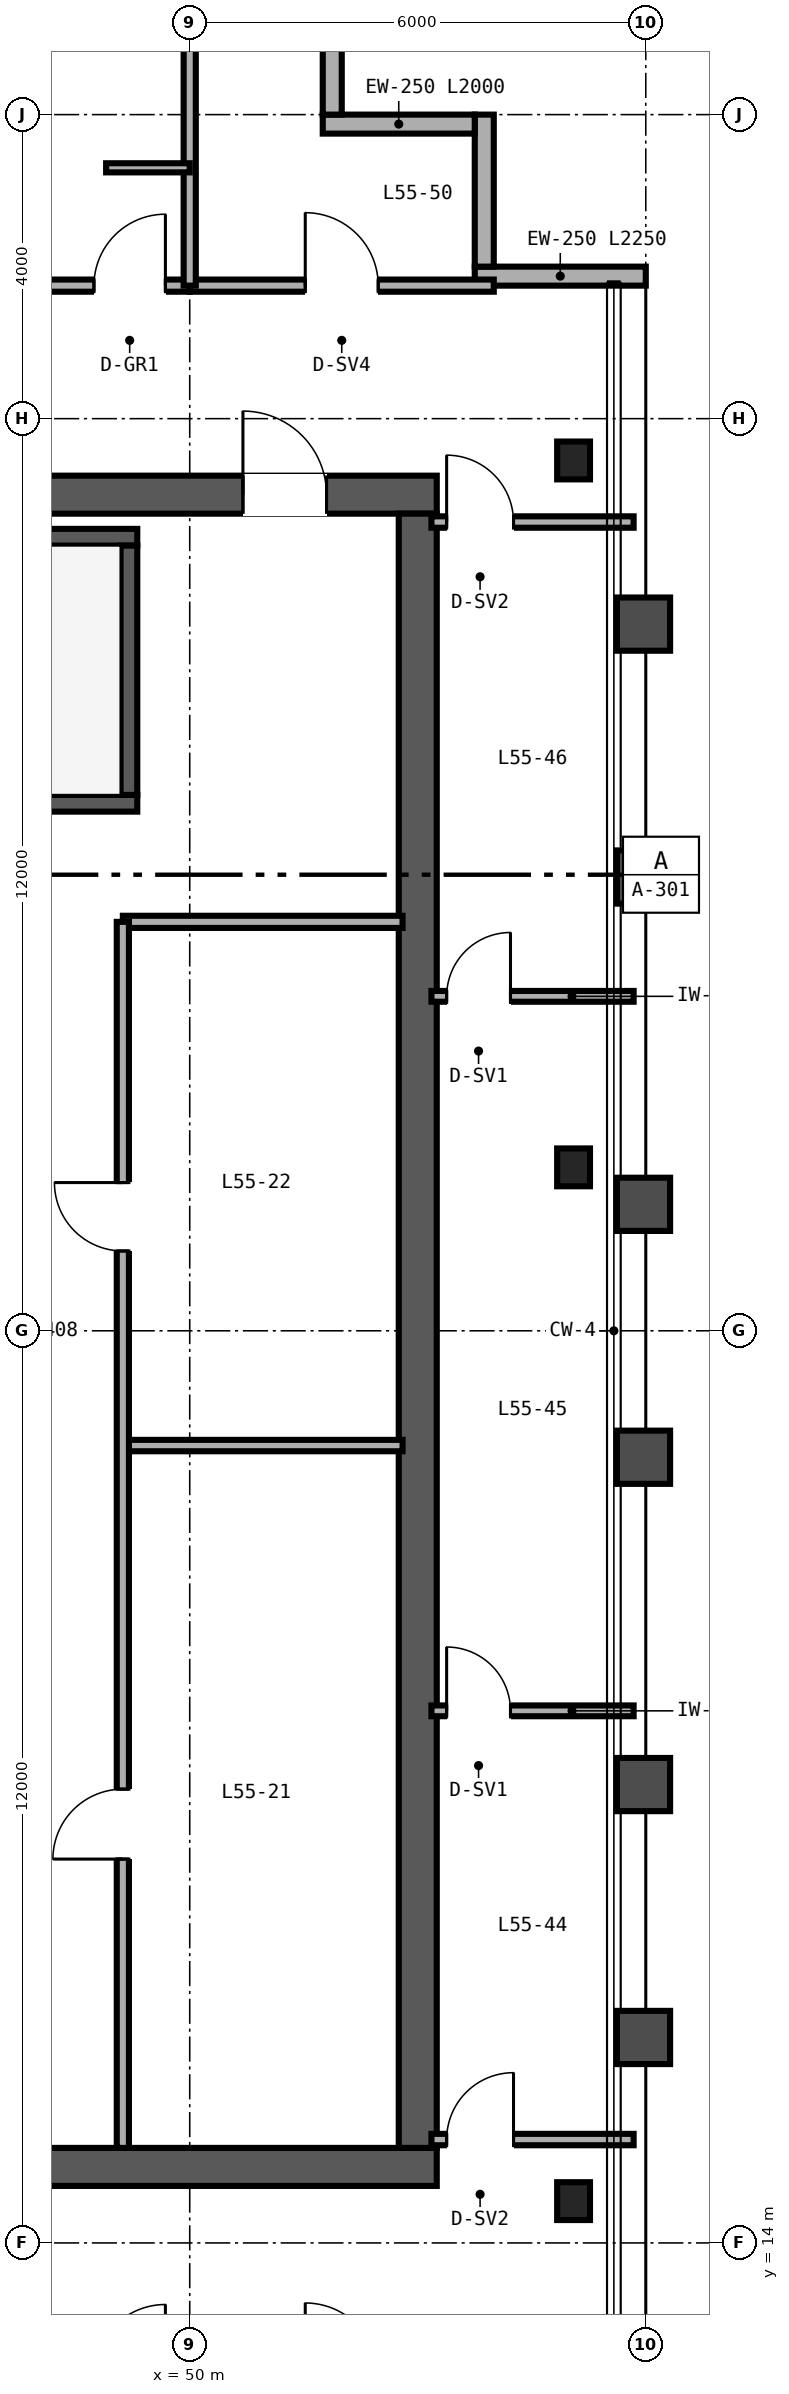
"""IFC4 building model, lengths in metres.
Left out: names, types, materials, properties, quantities, classifications, styles, units other than length and angle.
Written with IfcOpenShell. Run it as: python <this file> out.ifc"""

import sys

from ifc_helpers import new_model, si_unit, direction, frame, frame_2d, origin, origin_2d, place, context, subcontext, project, spatial, rectangle, i_section, extrude, source, transform, mapped, element, fill, save


model = new_model("IFC4")
c1 = context("Model", 3, precision=1e-05, world=origin(), true_north=direction((0.0, 1.0)))
c2 = subcontext(c1, "Body", "Model", "MODEL_VIEW")
j1 = project(units=[si_unit("LENGTHUNIT", "METRE"), si_unit("PLANEANGLEUNIT", "RADIAN")], contexts=[c1])
p1 = place(None, origin())
s1 = spatial("IfcSite", under=j1, at=p1, CompositionType="ELEMENT")
p2 = place(p1, origin())
s2 = spatial("IfcBuilding", under=s1, at=p2, CompositionType="ELEMENT")
p3 = place(p2, frame((0.0, 0.0, 217.2)))
s3 = spatial("IfcBuildingStorey", under=s2, at=p3, CompositionType="ELEMENT", Elevation=217.2)
p4 = place(p3, frame((40.75, 15.0, 0.0), z_axis=(0.0, 0.0, 1.0), x_axis=(1.0, 0.0, 0.0)))
e1 = element("IfcWall", 1, at=p4, inside=s3, PredefinedType="SHEAR", context=c2, shape_type="SweptSolid", body=[
    extrude(rectangle(XDim=12.5, YDim=0.5, at=frame_2d((6.25, 0.0))), origin(), (0.0, 0.0, 1.0), 3.28),
])
p5 = place(p4, frame((4.35, 0.0, 0.0)))
e2 = element("IfcOpeningElement", 2, at=p5, cuts=e1, PredefinedType="OPENING", context=c2, shape_type="SweptSolid", body=[
    extrude(rectangle(XDim=1.0, YDim=2.15, at=frame_2d((0.5, 1.075))), frame((0.0, 0.26, 0.0), z_axis=(0.0, -1.0, 0.0), x_axis=(1.0, 0.0, 0.0)), (0.0, 0.0, 1.0), 0.52),
])
p6 = place(p3, frame((40.75, 37.0, 0.0), z_axis=(0.0, 0.0, 1.0), x_axis=(1.0, 0.0, 0.0)))
e3 = element("IfcWall", 3, at=p6, inside=s3, PredefinedType="SHEAR", context=c2, shape_type="SweptSolid", body=[
    extrude(rectangle(XDim=12.5, YDim=0.5, at=frame_2d((6.25, 0.0))), origin(), (0.0, 0.0, 1.0), 3.28),
])
p7 = place(p6, frame((9.95, 0.0, 0.0)))
e4 = element("IfcOpeningElement", 4, at=p7, cuts=e3, PredefinedType="OPENING", context=c2, shape_type="SweptSolid", body=[
    extrude(rectangle(XDim=1.1, YDim=2.15, at=frame_2d((0.55, 1.075))), frame((0.0, 0.26, 0.0), z_axis=(0.0, -1.0, 0.0), x_axis=(1.0, 0.0, 0.0)), (0.0, 0.0, 1.0), 0.52),
])
p8 = place(p3, frame((53.0, 15.25, 0.0), z_axis=(0.0, 0.0, 1.0), x_axis=(0.0, 1.0, 0.0)))
e5 = element("IfcWall", 5, at=p8, inside=s3, PredefinedType="SHEAR", context=c2, shape_type="SweptSolid", body=[
    extrude(rectangle(XDim=21.5, YDim=0.5, at=frame_2d((10.75, 0.0))), origin(), (0.0, 0.0, 1.0), 3.28),
])
p9 = place(p3, frame((41.25, 32.94, 0.0), z_axis=(0.0, 0.0, 1.0), x_axis=(1.0, 0.0, 0.0)))
e6 = element("IfcWall", 6, at=p9, inside=s3, PredefinedType="SHEAR", context=c2, shape_type="SweptSolid", body=[
    extrude(rectangle(XDim=8.06, YDim=0.22, at=frame_2d((4.03, 0.0))), origin(), (0.0, 0.0, 1.0), 3.4),
])
p10 = place(p9, frame((0.67, 0.0, 0.0)))
e7 = element("IfcOpeningElement", 7, at=p10, cuts=e6, PredefinedType="OPENING", context=c2, shape_type="SweptSolid", body=[
    extrude(rectangle(XDim=1.05, YDim=2.15, at=frame_2d((0.525, 1.075))), frame((0.0, 0.12, 0.0), z_axis=(0.0, -1.0, 0.0), x_axis=(1.0, 0.0, 0.0)), (0.0, 0.0, 1.0), 0.24),
])
p11 = place(p3, frame((41.25, 36.44, 0.0), z_axis=(0.0, 0.0, 1.0), x_axis=(1.0, 0.0, 0.0)))
e8 = element("IfcWall", 8, at=p11, inside=s3, PredefinedType="SHEAR", context=c2, shape_type="SweptSolid", body=[
    extrude(rectangle(XDim=8.06, YDim=0.22, at=frame_2d((4.03, 0.0))), origin(), (0.0, 0.0, 1.0), 3.4),
])
p12 = place(p3, frame((49.2, 33.05, 0.0), z_axis=(0.0, 0.0, 1.0), x_axis=(0.0, 1.0, 0.0)))
e9 = element("IfcWall", 9, at=p12, inside=s3, PredefinedType="SHEAR", context=c2, shape_type="SweptSolid", body=[
    extrude(rectangle(XDim=3.28, YDim=0.22, at=frame_2d((1.64, 0.0))), origin(), (0.0, 0.0, 1.0), 3.4),
])
m1 = source(origin(), c2, "Body", "SweptSolid", [
    extrude(i_section(OverallWidth=0.432, OverallDepth=0.498, WebThickness=0.056, FlangeThickness=0.089, FilletRadius=0.025, at=origin_2d()), origin(), (0.0, 0.0, 1.0), 3.28),
])
for number, where, z_axis, x_axis in (
    (10, (55.05, 14.55, 0.0), (0.0, 0.0, 1.0), (1.0, 0.0, 0.0)),
    (11, (55.05, 28.15, 0.0), (0.0, 0.0, 1.0), (1.0, 0.0, 0.0)),
    (12, (55.05, 37.45, 0.0), (0.0, 0.0, 1.0), (1.0, 0.0, 0.0)),
):
    element("IfcColumn", number, at=place(p3, frame(where, z_axis=z_axis, x_axis=x_axis)), inside=s3, PredefinedType="COLUMN", context=c2, shape_type="MappedRepresentation", body=[
        mapped(m1, transform((0.0, 0.0, 0.0), scale=1.0)),
    ])
p13 = place(p3, frame((56.0, 39.875, 0.0), z_axis=(0.0, 0.0, 1.0), x_axis=(-1.0, 0.0, 0.0)))
e13 = element("IfcWall", 13, at=p13, inside=s3, PredefinedType="SOLIDWALL", context=c2, shape_type="SweptSolid", body=[
    extrude(rectangle(XDim=2.25, YDim=0.25, at=frame_2d((1.125, 0.0))), origin(), (0.0, 0.0, 1.0), 3.28),
])
for number, where, z_axis, x_axis in (
    (14, (53.875, 40.0, 0.0), (0.0, 0.0, 1.0), (0.0, 1.0, 0.0)),
    (15, (53.75, 41.875, 0.0), (0.0, 0.0, 1.0), (-1.0, 0.0, 0.0)),
    (16, (51.875, 42.0, 0.0), (0.0, 0.0, 1.0), (0.0, 1.0, 0.0)),
):
    element("IfcWall", number, at=place(p3, frame(where, z_axis=z_axis, x_axis=x_axis)), inside=s3, PredefinedType="SOLIDWALL", context=c2, shape_type="SweptSolid", body=[
        extrude(rectangle(XDim=2.0, YDim=0.25, at=frame_2d((1.0, 0.0))), origin(), (0.0, 0.0, 1.0), 3.28),
    ])
p14 = place(p3, frame((49.12, 31.38, 0.0), z_axis=(0.0, 0.0, 1.0), x_axis=(1.0, 0.0, 0.0)))
e17 = element("IfcWall", 17, at=p14, inside=s3, PredefinedType="PARTITIONING", context=c2, shape_type="SweptSolid", body=[
    extrude(rectangle(XDim=3.68, YDim=0.16, at=frame_2d((1.84, 0.0))), origin(), (0.0, 0.0, 1.0), 2.38),
])
p15 = place(p3, frame((49.12, 24.49, 0.0), z_axis=(0.0, 0.0, 1.0), x_axis=(1.0, 0.0, 0.0)))
e18 = element("IfcWall", 18, at=p15, inside=s3, PredefinedType="PARTITIONING", context=c2, shape_type="SweptSolid", body=[
    extrude(rectangle(XDim=3.68, YDim=0.15, at=frame_2d((1.84, 0.0))), origin(), (0.0, 0.0, 1.0), 3.28),
])
p16 = place(p3, frame((49.12, 15.25, 0.0), z_axis=(0.0, 0.0, 1.0), x_axis=(0.0, 1.0, 0.0)))
e19 = element("IfcWall", 19, at=p16, inside=s3, PredefinedType="PARTITIONING", context=c2, shape_type="SweptSolid", body=[
    extrude(rectangle(XDim=16.13, YDim=0.16, at=frame_2d((8.065, 0.0))), origin(), (0.0, 0.0, 1.0), 2.36),
])
p17 = place(p16, frame((3.8, 0.0, 0.0)))
e20 = element("IfcOpeningElement", 20, at=p17, cuts=e19, PredefinedType="OPENING", context=c2, shape_type="SweptSolid", body=[
    extrude(rectangle(XDim=0.92, YDim=2.15, at=frame_2d((0.46, 1.075))), frame((0.0, 0.09, 0.0), z_axis=(0.0, -1.0, 0.0), x_axis=(1.0, 0.0, 0.0)), (0.0, 0.0, 1.0), 0.18),
])
p18 = place(p16, frame((11.8, 0.0, 0.0)))
e21 = element("IfcOpeningElement", 21, at=p18, cuts=e19, PredefinedType="OPENING", context=c2, shape_type="SweptSolid", body=[
    extrude(rectangle(XDim=0.9, YDim=2.15, at=frame_2d((0.45, 1.075))), frame((0.0, 0.09, 0.0), z_axis=(0.0, -1.0, 0.0), x_axis=(1.0, 0.0, 0.0)), (0.0, 0.0, 1.0), 0.18),
])
p19 = place(p3, frame((53.18, 15.36, 0.0), z_axis=(0.0, 0.0, 1.0), x_axis=(1.0, 0.0, 0.0)))
e22 = element("IfcWall", 22, at=p19, inside=s3, PredefinedType="PARTITIONING", context=c2, shape_type="SweptSolid", body=[
    extrude(rectangle(XDim=2.66, YDim=0.15, at=frame_2d((1.33, 0.0))), origin(), (0.0, 0.0, 1.0), 2.501),
])
p20 = place(p19, frame((0.2, 0.0, 0.0)))
e23 = element("IfcOpeningElement", 23, at=p20, cuts=e22, PredefinedType="OPENING", context=c2, shape_type="SweptSolid", body=[
    extrude(rectangle(XDim=0.88, YDim=2.15, at=frame_2d((0.44, 1.075))), frame((0.0, 0.085, 0.0), z_axis=(0.0, -1.0, 0.0), x_axis=(1.0, 0.0, 0.0)), (0.0, 0.0, 1.0), 0.17),
])
p21 = place(p3, frame((53.18, 36.64, 0.0), z_axis=(0.0, 0.0, 1.0), x_axis=(1.0, 0.0, 0.0)))
e24 = element("IfcWall", 24, at=p21, inside=s3, PredefinedType="PARTITIONING", context=c2, shape_type="SweptSolid", body=[
    extrude(rectangle(XDim=2.66, YDim=0.15, at=frame_2d((1.33, 0.0))), origin(), (0.0, 0.0, 1.0), 2.663),
])
p22 = place(p21, frame((0.2, 0.0, 0.0)))
e25 = element("IfcOpeningElement", 25, at=p22, cuts=e24, PredefinedType="OPENING", context=c2, shape_type="SweptSolid", body=[
    extrude(rectangle(XDim=0.88, YDim=2.15, at=frame_2d((0.44, 1.075))), frame((0.0, 0.085, 0.0), z_axis=(0.0, -1.0, 0.0), x_axis=(1.0, 0.0, 0.0)), (0.0, 0.0, 1.0), 0.17),
])
p23 = place(p3, frame((53.18, 21.0, 0.0), z_axis=(0.0, 0.0, 1.0), x_axis=(1.0, 0.0, 0.0)))
e26 = element("IfcWall", 26, at=p23, inside=s3, PredefinedType="PARTITIONING", context=c2, shape_type="SweptSolid", body=[
    extrude(rectangle(XDim=2.66, YDim=0.142, at=frame_2d((1.33, 0.0))), origin(), (0.0, 0.0, 1.0), 2.501),
])
p24 = place(p23, frame((0.2, 0.0, 0.0)))
e27 = element("IfcOpeningElement", 27, at=p24, cuts=e26, PredefinedType="OPENING", context=c2, shape_type="SweptSolid", body=[
    extrude(rectangle(XDim=0.84, YDim=2.1, at=frame_2d((0.42, 1.05))), frame((0.0, 0.081, 0.0), z_axis=(0.0, -1.0, 0.0), x_axis=(1.0, 0.0, 0.0)), (0.0, 0.0, 1.0), 0.162),
])
p25 = place(p3, frame((53.18, 30.4, 0.0), z_axis=(0.0, 0.0, 1.0), x_axis=(1.0, 0.0, 0.0)))
e28 = element("IfcWall", 28, at=p25, inside=s3, PredefinedType="PARTITIONING", context=c2, shape_type="SweptSolid", body=[
    extrude(rectangle(XDim=2.66, YDim=0.142, at=frame_2d((1.33, 0.0))), origin(), (0.0, 0.0, 1.0), 2.663),
])
p26 = place(p25, frame((0.2, 0.0, 0.0)))
e29 = element("IfcOpeningElement", 29, at=p26, cuts=e28, PredefinedType="OPENING", context=c2, shape_type="SweptSolid", body=[
    extrude(rectangle(XDim=0.84, YDim=2.1, at=frame_2d((0.42, 1.05))), frame((0.0, 0.081, 0.0), z_axis=(0.0, -1.0, 0.0), x_axis=(1.0, 0.0, 0.0)), (0.0, 0.0, 1.0), 0.162),
])
p27 = place(p3, frame((50.0, 39.75, 0.0), z_axis=(0.0, 0.0, 1.0), x_axis=(1.0, 0.0, 0.0)))
e30 = element("IfcWall", 30, at=p27, inside=s3, PredefinedType="PARTITIONING", context=c2, shape_type="SweptSolid", body=[
    extrude(rectangle(XDim=4.0, YDim=0.16, at=frame_2d((2.0, 0.0))), origin(), (0.0, 0.0, 1.0), 3.28),
])
p28 = place(p27, frame((1.52, 0.0, 0.0)))
e31 = element("IfcOpeningElement", 31, at=p28, cuts=e30, PredefinedType="OPENING", context=c2, shape_type="SweptSolid", body=[
    extrude(rectangle(XDim=0.96, YDim=2.15, at=frame_2d((0.48, 1.075))), frame((0.0, 0.09, 0.0), z_axis=(0.0, -1.0, 0.0), x_axis=(1.0, 0.0, 0.0)), (0.0, 0.0, 1.0), 0.18),
])
p29 = place(p3, frame((14.0, 39.75, 0.0), z_axis=(0.0, 0.0, 1.0), x_axis=(1.0, 0.0, 0.0)))
e32 = element("IfcWall", 32, at=p29, inside=s3, PredefinedType="PARTITIONING", context=c2, shape_type="SweptSolid", body=[
    extrude(rectangle(XDim=36.0, YDim=0.16, at=frame_2d((18.0, 0.0))), origin(), (0.0, 0.0, 1.0), 2.823),
])
p30 = place(p29, frame((9.2, 0.0, 0.0)))
e33 = element("IfcOpeningElement", 33, at=p30, cuts=e32, PredefinedType="OPENING", context=c2, shape_type="SweptSolid", body=[
    extrude(rectangle(XDim=0.98, YDim=2.2, at=frame_2d((0.49, 1.1))), frame((0.0, 0.09, 0.0), z_axis=(0.0, -1.0, 0.0), x_axis=(1.0, 0.0, 0.0)), (0.0, 0.0, 1.0), 0.18),
])
p31 = place(p29, frame((19.2, 0.0, 0.0)))
e34 = element("IfcOpeningElement", 34, at=p31, cuts=e32, PredefinedType="OPENING", context=c2, shape_type="SweptSolid", body=[
    extrude(rectangle(XDim=0.98, YDim=2.2, at=frame_2d((0.49, 1.1))), frame((0.0, 0.09, 0.0), z_axis=(0.0, -1.0, 0.0), x_axis=(1.0, 0.0, 0.0)), (0.0, 0.0, 1.0), 0.18),
])
p32 = place(p29, frame((24.52, 0.0, 0.0)))
e35 = element("IfcOpeningElement", 35, at=p32, cuts=e32, PredefinedType="OPENING", context=c2, shape_type="SweptSolid", body=[
    extrude(rectangle(XDim=0.96, YDim=2.15, at=frame_2d((0.48, 1.075))), frame((0.0, 0.09, 0.0), z_axis=(0.0, -1.0, 0.0), x_axis=(1.0, 0.0, 0.0)), (0.0, 0.0, 1.0), 0.18),
])
p33 = place(p29, frame((34.74, 0.0, 0.0)))
e36 = element("IfcOpeningElement", 36, at=p33, cuts=e32, PredefinedType="OPENING", context=c2, shape_type="SweptSolid", body=[
    extrude(rectangle(XDim=0.94, YDim=2.15, at=frame_2d((0.47, 1.075))), frame((0.0, 0.09, 0.0), z_axis=(0.0, -1.0, 0.0), x_axis=(1.0, 0.0, 0.0)), (0.0, 0.0, 1.0), 0.18),
])
p34 = place(p3, frame((50.0, 39.75, 0.0), z_axis=(0.0, 0.0, 1.0), x_axis=(0.0, 1.0, 0.0)))
e37 = element("IfcWall", 37, at=p34, inside=s3, PredefinedType="PARTITIONING", context=c2, shape_type="SweptSolid", body=[
    extrude(rectangle(XDim=5.89, YDim=0.16, at=frame_2d((2.945, 0.0))), origin(), (0.0, 0.0, 1.0), 2.587),
])
p35 = place(p3, frame((48.9, 41.3, 0.0), z_axis=(0.0, 0.0, 1.0), x_axis=(1.0, 0.0, 0.0)))
e38 = element("IfcWall", 38, at=p35, inside=s3, PredefinedType="PARTITIONING", context=c2, shape_type="SweptSolid", body=[
    extrude(rectangle(XDim=1.1, YDim=0.12, at=frame_2d((0.55, 0.0))), origin(), (0.0, 0.0, 1.0), 3.28),
])
m2 = source(origin(), c2, "Body", "SweptSolid", [
    extrude(rectangle(XDim=1.1, YDim=2.15, at=frame_2d((0.55, 1.075))), frame((0.0, 0.025, 0.0), z_axis=(0.0, -1.0, 0.0), x_axis=(1.0, 0.0, 0.0)), (0.0, 0.0, 1.0), 0.05),
])
p36 = place(p7, origin())
e39 = element("IfcDoor", 39, at=p36, inside=s3, OperationType="SINGLE_SWING_LEFT", PredefinedType="DOOR", context=c2, shape_type="MappedRepresentation", body=[
    mapped(m2, transform((0.0, 0.0, 0.0), scale=1.0)),
])
fill(e4, e39)
m3 = source(origin(), c2, "Body", "SweptSolid", [
    extrude(rectangle(XDim=0.92, YDim=2.15, at=frame_2d((0.46, 1.075))), frame((0.0, 0.025, 0.0), z_axis=(0.0, -1.0, 0.0), x_axis=(1.0, 0.0, 0.0)), (0.0, 0.0, 1.0), 0.05),
])
p37 = place(p17, origin())
e40 = element("IfcDoor", 40, at=p37, inside=s3, OperationType="SINGLE_SWING_LEFT", PredefinedType="DOOR", context=c2, shape_type="MappedRepresentation", body=[
    mapped(m3, transform((0.0, 0.0, 0.0), scale=1.0)),
])
fill(e20, e40)
m4 = source(origin(), c2, "Body", "SweptSolid", [
    extrude(rectangle(XDim=0.9, YDim=2.15, at=frame_2d((0.45, 1.075))), frame((0.0, 0.025, 0.0), z_axis=(0.0, -1.0, 0.0), x_axis=(1.0, 0.0, 0.0)), (0.0, 0.0, 1.0), 0.05),
])
p38 = place(p18, origin())
e41 = element("IfcDoor", 41, at=p38, inside=s3, OperationType="SINGLE_SWING_RIGHT", PredefinedType="DOOR", context=c2, shape_type="MappedRepresentation", body=[
    mapped(m4, transform((0.0, 0.0, 0.0), scale=1.0)),
])
fill(e21, e41)
m5 = source(origin(), c2, "Body", "SweptSolid", [
    extrude(rectangle(XDim=0.88, YDim=2.15, at=frame_2d((0.44, 1.075))), frame((0.0, 0.025, 0.0), z_axis=(0.0, -1.0, 0.0), x_axis=(1.0, 0.0, 0.0)), (0.0, 0.0, 1.0), 0.05),
])
p39 = place(p20, origin())
e42 = element("IfcDoor", 42, at=p39, inside=s3, OperationType="SINGLE_SWING_RIGHT", PredefinedType="DOOR", context=c2, shape_type="MappedRepresentation", body=[
    mapped(m5, transform((0.0, 0.0, 0.0), scale=1.0)),
])
fill(e23, e42)
p40 = place(p22, origin())
e43 = element("IfcDoor", 43, at=p40, inside=s3, OperationType="SINGLE_SWING_LEFT", PredefinedType="DOOR", context=c2, shape_type="MappedRepresentation", body=[
    mapped(m5, transform((0.0, 0.0, 0.0), scale=1.0)),
])
fill(e25, e43)
m6 = source(origin(), c2, "Body", "SweptSolid", [
    extrude(rectangle(XDim=0.84, YDim=2.1, at=frame_2d((0.42, 1.05))), frame((0.0, 0.025, 0.0), z_axis=(0.0, -1.0, 0.0), x_axis=(1.0, 0.0, 0.0)), (0.0, 0.0, 1.0), 0.05),
])
p41 = place(p24, origin())
e44 = element("IfcDoor", 44, at=p41, inside=s3, OperationType="SINGLE_SWING_LEFT", PredefinedType="DOOR", context=c2, shape_type="MappedRepresentation", body=[
    mapped(m6, transform((0.0, 0.0, 0.0), scale=1.0)),
])
fill(e27, e44)
p42 = place(p26, origin())
e45 = element("IfcDoor", 45, at=p42, inside=s3, OperationType="SINGLE_SWING_RIGHT", PredefinedType="DOOR", context=c2, shape_type="MappedRepresentation", body=[
    mapped(m6, transform((0.0, 0.0, 0.0), scale=1.0)),
])
fill(e29, e45)
m7 = source(origin(), c2, "Body", "SweptSolid", [
    extrude(rectangle(XDim=0.96, YDim=2.15, at=frame_2d((0.48, 1.075))), frame((0.0, 0.025, 0.0), z_axis=(0.0, -1.0, 0.0), x_axis=(1.0, 0.0, 0.0)), (0.0, 0.0, 1.0), 0.05),
])
p43 = place(p28, origin())
e46 = element("IfcDoor", 46, at=p43, inside=s3, OperationType="SINGLE_SWING_LEFT", PredefinedType="DOOR", context=c2, shape_type="MappedRepresentation", body=[
    mapped(m7, transform((0.0, 0.0, 0.0), scale=1.0)),
])
fill(e31, e46)
m8 = source(origin(), c2, "Body", "SweptSolid", [
    extrude(rectangle(XDim=0.94, YDim=2.15, at=frame_2d((0.47, 1.075))), frame((0.0, 0.025, 0.0), z_axis=(0.0, -1.0, 0.0), x_axis=(1.0, 0.0, 0.0)), (0.0, 0.0, 1.0), 0.05),
])
p44 = place(p33, origin())
e47 = element("IfcDoor", 47, at=p44, inside=s3, OperationType="SINGLE_SWING_RIGHT", PredefinedType="DOOR", context=c2, shape_type="MappedRepresentation", body=[
    mapped(m8, transform((0.0, 0.0, 0.0), scale=1.0)),
])
fill(e36, e47)
save(model, sys.argv[1])
